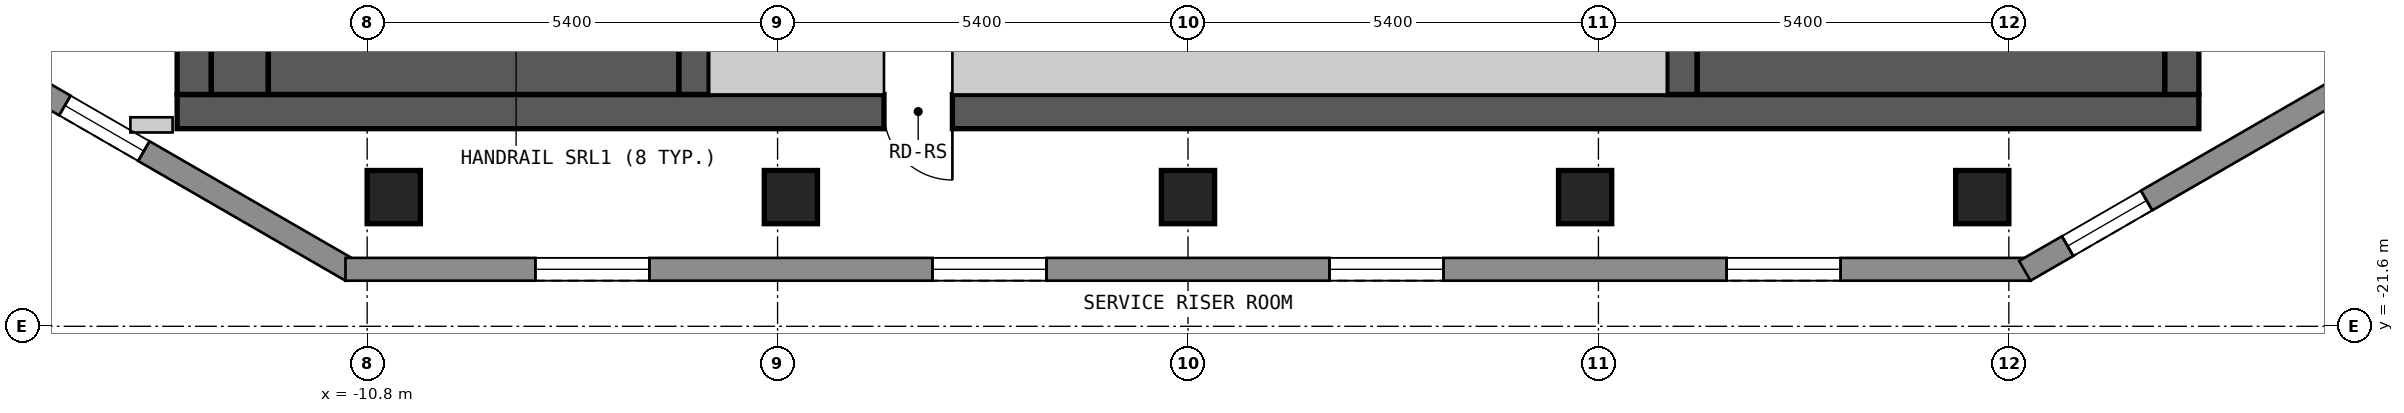
"""IFC4 building model, lengths in metres.
Left out: names, types, materials, properties, quantities, classifications, styles, units other than length and angle.
Written with IfcOpenShell. Run it as: python <this file> out.ifc"""

import sys

from ifc_helpers import new_model, si_unit, direction, frame, frame_2d, origin, origin_2d, place, context, subcontext, project, spatial, polyline, rectangle, outline, extrude, element, fill, save


model = new_model("IFC4")
c1 = context("Model", 3, precision=1e-05, world=origin(), true_north=direction((0.0, 1.0)))
c2 = subcontext(c1, "Body", "Model", "MODEL_VIEW")
j1 = project(units=[si_unit("LENGTHUNIT", "METRE"), si_unit("PLANEANGLEUNIT", "RADIAN")], contexts=[c1])
p1 = place(None, origin())
s1 = spatial("IfcSite", under=j1, at=p1, CompositionType="ELEMENT")
p2 = place(p1, origin())
s2 = spatial("IfcBuilding", under=s1, at=p2, CompositionType="ELEMENT")
p3 = place(p2, frame((0.0, 0.0, 217.8)))
s3 = spatial("IfcBuildingStorey", under=s2, at=p3, CompositionType="ELEMENT", Elevation=217.8)
for number, where, z_axis, x_axis in (
    (1, (-10.45, -19.9, 0.0), (0.0, 0.0, 1.0), (1.0, 0.0, 0.0)),
    (2, (-5.225, -19.9, 0.0), (0.0, 0.0, 1.0), (1.0, 0.0, 0.0)),
    (3, (0.0, -19.9, 0.0), (0.0, 0.0, 1.0), (1.0, 0.0, 0.0)),
    (4, (5.225, -19.9, 0.0), (0.0, 0.0, 1.0), (1.0, 0.0, 0.0)),
    (5, (10.45, -19.9, 0.0), (0.0, 0.0, 1.0), (1.0, 0.0, 0.0)),
):
    element("IfcColumn", number, at=place(p3, frame(where, z_axis=z_axis, x_axis=x_axis)), inside=s3, PredefinedType="COLUMN", context=c2, shape_type="SweptSolid", body=[
        extrude(rectangle(XDim=0.7, YDim=0.7, at=origin_2d()), origin(), (0.0, 0.0, 1.0), 3.0),
    ])
p4 = place(p3, frame((-13.3, -18.775, 0.0), z_axis=(0.0, 0.0, 1.0), x_axis=(1.0, 0.0, 0.0)))
e6 = element("IfcWall", 6, at=p4, inside=s3, PredefinedType="SHEAR", context=c2, shape_type="SweptSolid", body=[
    extrude(rectangle(XDim=26.6, YDim=0.45, at=frame_2d((13.3, 0.0))), origin(), (0.0, 0.0, 1.0), 2.7),
])
p5 = place(p4, frame((9.3, 0.0, 0.0)))
e7 = element("IfcOpeningElement", 7, at=p5, cuts=e6, PredefinedType="OPENING", context=c2, shape_type="SweptSolid", body=[
    extrude(rectangle(XDim=0.9, YDim=2.1, at=frame_2d((0.45, 1.05))), frame((0.0, 0.235, 0.0), z_axis=(0.0, -1.0, 0.0), x_axis=(1.0, 0.0, 0.0)), (0.0, 0.0, 1.0), 0.47),
])
p6 = place(p3, frame((-13.075, -18.55, 0.0), z_axis=(0.0, 0.0, 1.0), x_axis=(0.0, 1.0, 0.0)))
e8 = element("IfcWall", 8, at=p6, inside=s3, PredefinedType="SHEAR", context=c2, shape_type="SweptSolid", body=[
    extrude(rectangle(XDim=13.1, YDim=0.45, at=frame_2d((6.55, 0.0))), origin(), (0.0, 0.0, 1.0), 2.7),
])
p7 = place(p6, frame((4.35, 0.0, 0.0)))
e9 = element("IfcOpeningElement", 9, at=p7, cuts=e8, PredefinedType="OPENING", context=c2, shape_type="SweptSolid", body=[
    extrude(rectangle(XDim=1.2, YDim=2.1, at=frame_2d((0.6, 1.05))), frame((0.0, 0.235, 0.0), z_axis=(0.0, -1.0, 0.0), x_axis=(1.0, 0.0, 0.0)), (0.0, 0.0, 1.0), 0.47),
])
p8 = place(p3, frame((13.075, -18.55, 0.0), z_axis=(0.0, 0.0, 1.0), x_axis=(0.0, 1.0, 0.0)))
e10 = element("IfcWall", 10, at=p8, inside=s3, PredefinedType="SHEAR", context=c2, shape_type="SweptSolid", body=[
    extrude(rectangle(XDim=13.1, YDim=0.45, at=frame_2d((6.55, 0.0))), origin(), (0.0, 0.0, 1.0), 2.7),
])
for number, where, z_axis, x_axis in (
    (11, (-6.5, -18.55, 0.0), (0.0, 0.0, 1.0), (0.0, 1.0, 0.0)),
    (12, (6.5, -18.55, 0.0), (0.0, 0.0, 1.0), (0.0, 1.0, 0.0)),
):
    element("IfcWall", number, at=place(p3, frame(where, z_axis=z_axis, x_axis=x_axis)), inside=s3, PredefinedType="SHEAR", context=c2, shape_type="SweptSolid", body=[
        extrude(rectangle(XDim=3.7, YDim=0.4, at=frame_2d((1.85, 0.0))), origin(), (0.0, 0.0, 1.0), 2.7),
    ])
p9 = place(p3, frame((-15.34, -18.37, 0.0), z_axis=(0.0, 0.0, 1.0), x_axis=(0.866022959057, -0.500004234368, 0.0)))
e13 = element("IfcWall", 13, at=p9, inside=s3, PredefinedType="SOLIDWALL", context=c2, shape_type="SweptSolid", body=[
    extrude(outline(polyline([(0.0, -0.15), (5.0, -0.15), (4.92, 0.15), (0.08, 0.15), (0.0, -0.15)])), origin(), (0.0, 0.0, 1.0), 2.7),
])
p10 = place(p9, frame((0.65, 0.0, 0.15)))
e14 = element("IfcOpeningElement", 14, at=p10, cuts=e13, PredefinedType="OPENING", context=c2, shape_type="SweptSolid", body=[
    extrude(rectangle(XDim=1.2, YDim=2.1, at=frame_2d((0.6, 1.05))), frame((0.0, 0.16, 0.0), z_axis=(0.0, -1.0, 0.0), x_axis=(1.0, 0.0, 0.0)), (0.0, 0.0, 1.0), 0.32),
])
p11 = place(p3, frame((-11.085, -20.85, 0.0), z_axis=(0.0, 0.0, 1.0), x_axis=(1.0, 0.0, 0.0)))
e15 = element("IfcWall", 15, at=p11, inside=s3, PredefinedType="SOLIDWALL", context=c2, shape_type="SweptSolid", body=[
    extrude(outline(polyline([(0.0, -0.15), (22.17, -0.15), (22.09, 0.15), (0.08, 0.15), (0.0, -0.15)])), origin(), (0.0, 0.0, 1.0), 2.7),
])
p12 = place(p11, frame((2.498, 0.0, 0.15)))
e16 = element("IfcOpeningElement", 16, at=p12, cuts=e15, PredefinedType="OPENING", context=c2, shape_type="SweptSolid", body=[
    extrude(rectangle(XDim=1.5, YDim=2.1, at=frame_2d((0.75, 1.05))), frame((0.0, 0.16, 0.0), z_axis=(0.0, -1.0, 0.0), x_axis=(1.0, 0.0, 0.0)), (0.0, 0.0, 1.0), 0.32),
])
p13 = place(p11, frame((7.723, 0.0, 0.15)))
e17 = element("IfcOpeningElement", 17, at=p13, cuts=e15, PredefinedType="OPENING", context=c2, shape_type="SweptSolid", body=[
    extrude(rectangle(XDim=1.5, YDim=2.1, at=frame_2d((0.75, 1.05))), frame((0.0, 0.16, 0.0), z_axis=(0.0, -1.0, 0.0), x_axis=(1.0, 0.0, 0.0)), (0.0, 0.0, 1.0), 0.32),
])
p14 = place(p11, frame((12.947, 0.0, 0.15)))
e18 = element("IfcOpeningElement", 18, at=p14, cuts=e15, PredefinedType="OPENING", context=c2, shape_type="SweptSolid", body=[
    extrude(rectangle(XDim=1.5, YDim=2.1, at=frame_2d((0.75, 1.05))), frame((0.0, 0.16, 0.0), z_axis=(0.0, -1.0, 0.0), x_axis=(1.0, 0.0, 0.0)), (0.0, 0.0, 1.0), 0.32),
])
p15 = place(p11, frame((18.172, 0.0, 0.15)))
e19 = element("IfcOpeningElement", 19, at=p15, cuts=e15, PredefinedType="OPENING", context=c2, shape_type="SweptSolid", body=[
    extrude(rectangle(XDim=1.5, YDim=2.1, at=frame_2d((0.75, 1.05))), frame((0.0, 0.16, 0.0), z_axis=(0.0, -1.0, 0.0), x_axis=(1.0, 0.0, 0.0)), (0.0, 0.0, 1.0), 0.32),
])
p16 = place(p3, frame((11.01, -20.87, 0.0), z_axis=(0.0, 0.0, 1.0), x_axis=(0.866022959057, 0.500004234368, 0.0)))
e20 = element("IfcWall", 20, at=p16, inside=s3, PredefinedType="SOLIDWALL", context=c2, shape_type="SweptSolid", body=[
    extrude(outline(polyline([(0.0, -0.15), (5.0, -0.15), (4.92, 0.15), (0.08, 0.15), (0.0, -0.15)])), origin(), (0.0, 0.0, 1.0), 2.7),
])
p17 = place(p16, frame((0.65, 0.0, 0.15)))
e21 = element("IfcOpeningElement", 21, at=p17, cuts=e20, PredefinedType="OPENING", context=c2, shape_type="SweptSolid", body=[
    extrude(rectangle(XDim=1.2, YDim=2.1, at=frame_2d((0.6, 1.05))), frame((0.0, 0.16, 0.0), z_axis=(0.0, -1.0, 0.0), x_axis=(1.0, 0.0, 0.0)), (0.0, 0.0, 1.0), 0.32),
])
p18 = place(p3, frame((-13.915, -18.95, 0.0), z_axis=(0.0, 0.0, 1.0), x_axis=(1.0, 0.0, 0.0)))
e22 = element("IfcWall", 22, at=p18, inside=s3, PredefinedType="PARTITIONING", context=c2, shape_type="SweptSolid", body=[
    extrude(rectangle(XDim=0.555, YDim=0.2, at=frame_2d((0.277, 0.0))), origin(), (0.0, 0.0, 1.0), 2.7),
])
p19 = place(p3, frame((-12.475, -18.55, 0.0), z_axis=(0.0, 0.0, 1.0), x_axis=(0.0, 1.0, 0.0)))
e23 = element("IfcWall", 23, at=p19, inside=s3, PredefinedType="SOLIDWALL", context=c2, shape_type="SweptSolid", body=[
    extrude(rectangle(XDim=3.7, YDim=0.75, at=frame_2d((1.85, 0.0))), origin(), (0.0, 0.0, 1.0), 2.7),
])
p20 = place(p3, frame((-12.1, -18.175, 0.0), z_axis=(0.0, 0.0, 1.0), x_axis=(1.0, 0.0, 0.0)))
e24 = element("IfcWall", 24, at=p20, inside=s3, PredefinedType="SOLIDWALL", context=c2, shape_type="SweptSolid", body=[
    extrude(rectangle(XDim=5.4, YDim=0.75, at=frame_2d((2.7, 0.0))), origin(), (0.0, 0.0, 1.0), 2.7),
])
p21 = place(p3, frame((-6.3, -18.175, 0.0), z_axis=(0.0, 0.0, 1.0), x_axis=(1.0, 0.0, 0.0)))
e25 = element("IfcWall", 25, at=p21, inside=s3, PredefinedType="PARTITIONING", context=c2, shape_type="SweptSolid", body=[
    extrude(rectangle(XDim=2.3, YDim=0.75, at=frame_2d((1.15, 0.0))), origin(), (0.0, 0.0, 1.0), 2.7),
])
p22 = place(p3, frame((-3.1, -18.175, 0.0), z_axis=(0.0, 0.0, 1.0), x_axis=(1.0, 0.0, 0.0)))
e26 = element("IfcWall", 26, at=p22, inside=s3, PredefinedType="PARTITIONING", context=c2, shape_type="SweptSolid", body=[
    extrude(rectangle(XDim=9.4, YDim=0.75, at=frame_2d((4.7, 0.0))), origin(), (0.0, 0.0, 1.0), 2.7),
])
p23 = place(p3, frame((6.7, -18.075, 0.0), z_axis=(0.0, 0.0, 1.0), x_axis=(1.0, 0.0, 0.0)))
e27 = element("IfcWall", 27, at=p23, inside=s3, PredefinedType="SOLIDWALL", context=c2, shape_type="SweptSolid", body=[
    extrude(rectangle(XDim=6.15, YDim=0.95, at=frame_2d((3.075, 0.0))), origin(), (0.0, 0.0, 1.0), 2.7),
])
p24 = place(p10, origin())
e28 = element("IfcWindow", 28, at=p24, inside=s3, PartitioningType="SINGLE_PANEL", PredefinedType="WINDOW", context=c2, shape_type="SweptSolid", body=[
    extrude(rectangle(XDim=1.2, YDim=2.1, at=frame_2d((0.6, 1.05))), frame((0.0, 0.03, 0.0), z_axis=(0.0, -1.0, 0.0), x_axis=(1.0, 0.0, 0.0)), (0.0, 0.0, 1.0), 0.06),
])
fill(e14, e28)
p25 = place(p12, origin())
e29 = element("IfcWindow", 29, at=p25, inside=s3, PartitioningType="SINGLE_PANEL", PredefinedType="WINDOW", context=c2, shape_type="SweptSolid", body=[
    extrude(rectangle(XDim=1.5, YDim=2.1, at=frame_2d((0.75, 1.05))), frame((0.0, 0.03, 0.0), z_axis=(0.0, -1.0, 0.0), x_axis=(1.0, 0.0, 0.0)), (0.0, 0.0, 1.0), 0.06),
])
fill(e16, e29)
p26 = place(p13, origin())
e30 = element("IfcWindow", 30, at=p26, inside=s3, PartitioningType="SINGLE_PANEL", PredefinedType="WINDOW", context=c2, shape_type="SweptSolid", body=[
    extrude(rectangle(XDim=1.5, YDim=2.1, at=frame_2d((0.75, 1.05))), frame((0.0, 0.03, 0.0), z_axis=(0.0, -1.0, 0.0), x_axis=(1.0, 0.0, 0.0)), (0.0, 0.0, 1.0), 0.06),
])
fill(e17, e30)
p27 = place(p14, origin())
e31 = element("IfcWindow", 31, at=p27, inside=s3, PartitioningType="SINGLE_PANEL", PredefinedType="WINDOW", context=c2, shape_type="SweptSolid", body=[
    extrude(rectangle(XDim=1.5, YDim=2.1, at=frame_2d((0.75, 1.05))), frame((0.0, 0.03, 0.0), z_axis=(0.0, -1.0, 0.0), x_axis=(1.0, 0.0, 0.0)), (0.0, 0.0, 1.0), 0.06),
])
fill(e18, e31)
p28 = place(p15, origin())
e32 = element("IfcWindow", 32, at=p28, inside=s3, PartitioningType="SINGLE_PANEL", PredefinedType="WINDOW", context=c2, shape_type="SweptSolid", body=[
    extrude(rectangle(XDim=1.5, YDim=2.1, at=frame_2d((0.75, 1.05))), frame((0.0, 0.03, 0.0), z_axis=(0.0, -1.0, 0.0), x_axis=(1.0, 0.0, 0.0)), (0.0, 0.0, 1.0), 0.06),
])
fill(e19, e32)
p29 = place(p17, origin())
e33 = element("IfcWindow", 33, at=p29, inside=s3, PartitioningType="SINGLE_PANEL", PredefinedType="WINDOW", context=c2, shape_type="SweptSolid", body=[
    extrude(rectangle(XDim=1.2, YDim=2.1, at=frame_2d((0.6, 1.05))), frame((0.0, 0.03, 0.0), z_axis=(0.0, -1.0, 0.0), x_axis=(1.0, 0.0, 0.0)), (0.0, 0.0, 1.0), 0.06),
])
fill(e21, e33)
p30 = place(p5, origin())
e34 = element("IfcDoor", 34, at=p30, inside=s3, OperationType="SINGLE_SWING_RIGHT", PredefinedType="DOOR", context=c2, shape_type="SweptSolid", body=[
    extrude(rectangle(XDim=0.9, YDim=2.1, at=frame_2d((0.45, 1.05))), frame((0.0, 0.025, 0.0), z_axis=(0.0, -1.0, 0.0), x_axis=(1.0, 0.0, 0.0)), (0.0, 0.0, 1.0), 0.05),
])
fill(e7, e34)
save(model, sys.argv[1])
